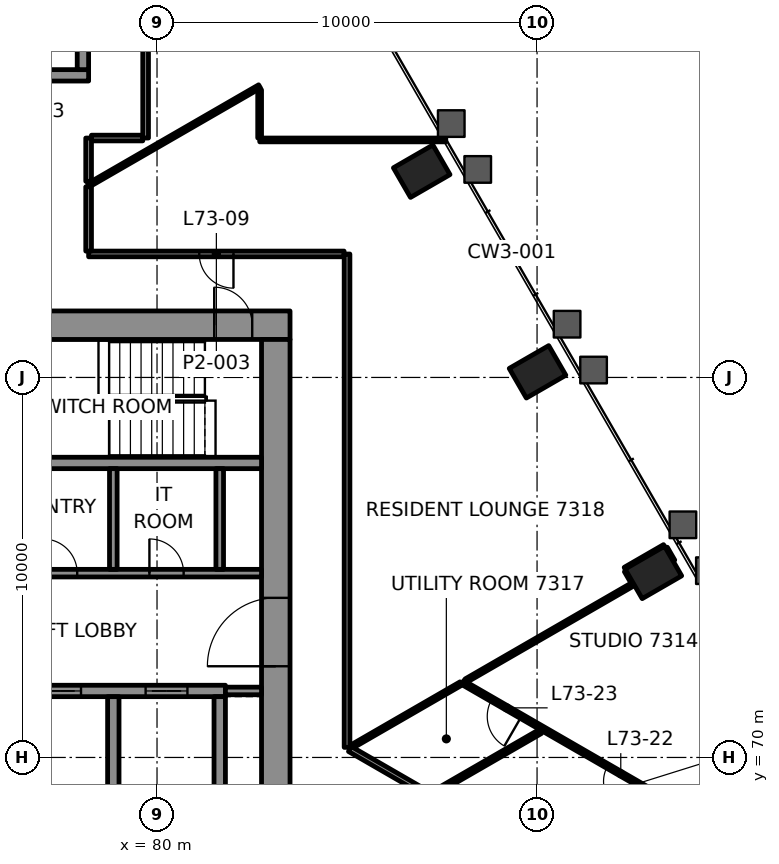
"""IFC4 building model, lengths in metres.
Left out: names, types, materials, properties, quantities, classifications, styles, units other than length and angle.
Written with IfcOpenShell. Run it as: python <this file> out.ifc"""

import sys

from ifc_helpers import new_model, si_unit, direction, frame, frame_2d, origin, origin_2d, place, context, subcontext, project, spatial, rectangle, hollow_rectangle, extrude, element, fill, save


model = new_model("IFC4")
c1 = context("Model", 3, precision=1e-05, world=origin(), true_north=direction((0.0, 1.0)))
c2 = subcontext(c1, "Body", "Model", "MODEL_VIEW")
j1 = project(units=[si_unit("LENGTHUNIT", "METRE"), si_unit("PLANEANGLEUNIT", "RADIAN")], contexts=[c1])
p1 = place(None, origin())
s1 = spatial("IfcSite", under=j1, at=p1, CompositionType="ELEMENT")
p2 = place(p1, origin())
s2 = spatial("IfcBuilding", under=s1, at=p2, CompositionType="ELEMENT")
p3 = place(p2, frame((0.0, 0.0, 302.1)))
s3 = spatial("IfcBuildingStorey", under=s2, at=p3, CompositionType="ELEMENT", Elevation=302.1)
for number, where, z_axis, x_axis in (
    (1, (93.061, 74.869, -0.0), (0.0, 0.0, 1.0), (-0.5, 0.866, 0.0)),
    (2, (90.013, 80.148, -0.0), (0.0, 0.0, 1.0), (-0.5, 0.866, 0.0)),
    (3, (86.965, 85.427, -0.0), (0.0, 0.0, 1.0), (-0.5, 0.866, 0.0)),
):
    element("IfcColumn", number, at=place(p3, frame(where, z_axis=z_axis, x_axis=x_axis)), inside=s3, PredefinedType="COLUMN", context=c2, shape_type="SweptSolid", body=[
        extrude(hollow_rectangle(XDim=0.9, YDim=1.2, WallThickness=0.06, at=origin_2d()), origin(), (0.0, 0.0, 1.0), 3.5),
    ])
p4 = place(p3, frame((66.5, 81.375, 0.0), z_axis=(0.0, 0.0, 1.0), x_axis=(1.0, 0.0, 0.0)))
e4 = element("IfcWall", 4, at=p4, inside=s3, PredefinedType="SHEAR", context=c2, shape_type="SweptSolid", body=[
    extrude(rectangle(XDim=17.0, YDim=0.75, at=frame_2d((8.5, 0.0))), origin(), (0.0, 0.0, 1.0), 3.3),
])
p5 = place(p4, frame((1.195, 0.0, 0.0)))
e5 = element("IfcOpeningElement", 5, at=p5, cuts=e4, PredefinedType="OPENING", context=c2, shape_type="SweptSolid", body=[
    extrude(rectangle(XDim=1.0, YDim=2.1, at=frame_2d((0.5, 1.05))), frame((0.0, 0.385, 0.0), z_axis=(0.0, -1.0, 0.0), x_axis=(1.0, 0.0, 0.0)), (0.0, 0.0, 1.0), 0.77),
])
p6 = place(p4, frame((15.005, 0.0, 0.0)))
e6 = element("IfcOpeningElement", 6, at=p6, cuts=e4, PredefinedType="OPENING", context=c2, shape_type="SweptSolid", body=[
    extrude(rectangle(XDim=1.0, YDim=2.1, at=frame_2d((0.5, 1.05))), frame((0.0, 0.385, 0.0), z_axis=(0.0, -1.0, 0.0), x_axis=(1.0, 0.0, 0.0)), (0.0, 0.0, 1.0), 0.77),
])
p7 = place(p4, frame((8.15, 0.0, 0.0)))
e7 = element("IfcOpeningElement", 7, at=p7, cuts=e4, PredefinedType="OPENING", context=c2, shape_type="SweptSolid", body=[
    extrude(rectangle(XDim=0.9, YDim=2.1, at=frame_2d((0.45, 1.05))), frame((0.0, 0.385, 0.0), z_axis=(0.0, -1.0, 0.0), x_axis=(1.0, 0.0, 0.0)), (0.0, 0.0, 1.0), 0.77),
])
p8 = place(p3, frame((83.125, 69.0, 0.0), z_axis=(0.0, 0.0, 1.0), x_axis=(0.0, 1.0, 0.0)))
e8 = element("IfcWall", 8, at=p8, inside=s3, PredefinedType="SHEAR", context=c2, shape_type="SweptSolid", body=[
    extrude(rectangle(XDim=12.0, YDim=0.75, at=frame_2d((6.0, 0.0))), origin(), (0.0, 0.0, 1.0), 3.3),
])
p9 = place(p8, frame((3.4, 0.0, 0.0)))
e9 = element("IfcOpeningElement", 9, at=p9, cuts=e8, PredefinedType="OPENING", context=c2, shape_type="SweptSolid", body=[
    extrude(rectangle(XDim=1.8, YDim=2.1, at=frame_2d((0.9, 1.05))), frame((0.0, 0.385, 0.0), z_axis=(0.0, -1.0, 0.0), x_axis=(1.0, 0.0, 0.0)), (0.0, 0.0, 1.0), 0.77),
])
p10 = place(p3, frame((70.3, 71.75, 0.0), z_axis=(0.0, 0.0, 1.0), x_axis=(1.0, 0.0, 0.0)))
e10 = element("IfcWall", 10, at=p10, inside=s3, PredefinedType="SHEAR", context=c2, shape_type="SweptSolid", body=[
    extrude(rectangle(XDim=11.5, YDim=0.3, at=frame_2d((5.75, 0.0))), origin(), (0.0, 0.0, 1.0), 3.3),
])
p11 = place(p10, frame((1.0, 0.0, 0.0)))
e11 = element("IfcOpeningElement", 11, at=p11, cuts=e10, PredefinedType="OPENING", context=c2, shape_type="SweptSolid", body=[
    extrude(rectangle(XDim=1.1, YDim=2.1, at=frame_2d((0.55, 1.05))), frame((0.0, 0.16, 0.0), z_axis=(0.0, -1.0, 0.0), x_axis=(1.0, 0.0, 0.0)), (0.0, 0.0, 1.0), 0.32),
])
p12 = place(p10, frame((3.8, 0.0, 0.0)))
e12 = element("IfcOpeningElement", 12, at=p12, cuts=e10, PredefinedType="OPENING", context=c2, shape_type="SweptSolid", body=[
    extrude(rectangle(XDim=1.1, YDim=2.1, at=frame_2d((0.55, 1.05))), frame((0.0, 0.16, 0.0), z_axis=(0.0, -1.0, 0.0), x_axis=(1.0, 0.0, 0.0)), (0.0, 0.0, 1.0), 0.32),
])
p13 = place(p10, frame((6.6, 0.0, 0.0)))
e13 = element("IfcOpeningElement", 13, at=p13, cuts=e10, PredefinedType="OPENING", context=c2, shape_type="SweptSolid", body=[
    extrude(rectangle(XDim=1.1, YDim=2.1, at=frame_2d((0.55, 1.05))), frame((0.0, 0.16, 0.0), z_axis=(0.0, -1.0, 0.0), x_axis=(1.0, 0.0, 0.0)), (0.0, 0.0, 1.0), 0.32),
])
p14 = place(p10, frame((9.4, 0.0, 0.0)))
e14 = element("IfcOpeningElement", 14, at=p14, cuts=e10, PredefinedType="OPENING", context=c2, shape_type="SweptSolid", body=[
    extrude(rectangle(XDim=1.1, YDim=2.1, at=frame_2d((0.55, 1.05))), frame((0.0, 0.16, 0.0), z_axis=(0.0, -1.0, 0.0), x_axis=(1.0, 0.0, 0.0)), (0.0, 0.0, 1.0), 0.32),
])
for number, where, z_axis, x_axis in (
    (15, (78.85, 69.0, 0.0), (0.0, 0.0, 1.0), (0.0, 1.0, 0.0)),
    (16, (81.65, 69.0, 0.0), (0.0, 0.0, 1.0), (0.0, 1.0, 0.0)),
):
    element("IfcWall", number, at=place(p3, frame(where, z_axis=z_axis, x_axis=x_axis)), inside=s3, PredefinedType="SHEAR", context=c2, shape_type="SweptSolid", body=[
        extrude(rectangle(XDim=2.6, YDim=0.3, at=frame_2d((1.3, 0.0))), origin(), (0.0, 0.0, 1.0), 3.3),
    ])
p15 = place(p3, frame((67.25, 77.75, 0.0), z_axis=(0.0, 0.0, 1.0), x_axis=(1.0, 0.0, 0.0)))
e17 = element("IfcWall", 17, at=p15, inside=s3, PredefinedType="SHEAR", context=c2, shape_type="SweptSolid", body=[
    extrude(rectangle(XDim=15.5, YDim=0.3, at=frame_2d((7.75, 0.0))), origin(), (0.0, 0.0, 1.0), 3.3),
])
p16 = place(p15, frame((0.445, 0.0, 0.0)))
e18 = element("IfcOpeningElement", 18, at=p16, cuts=e17, PredefinedType="OPENING", context=c2, shape_type="SweptSolid", body=[
    extrude(rectangle(XDim=1.0, YDim=2.1, at=frame_2d((0.5, 1.05))), frame((0.0, 0.16, 0.0), z_axis=(0.0, -1.0, 0.0), x_axis=(1.0, 0.0, 0.0)), (0.0, 0.0, 1.0), 0.32),
])
p17 = place(p3, frame((71.8, 87.95, 0.0), z_axis=(0.0, 0.0, 1.0), x_axis=(1.0, 0.0, 0.0)))
e19 = element("IfcWall", 19, at=p17, inside=s3, PredefinedType="SHEAR", context=c2, shape_type="SweptSolid", body=[
    extrude(rectangle(XDim=6.4, YDim=0.3, at=frame_2d((3.2, 0.0))), origin(), (0.0, 0.0, 1.0), 3.3),
])
p18 = place(p17, frame((1.325, 0.0, 0.0)))
e20 = element("IfcOpeningElement", 20, at=p18, cuts=e19, PredefinedType="OPENING", context=c2, shape_type="SweptSolid", body=[
    extrude(rectangle(XDim=1.0, YDim=2.1, at=frame_2d((0.5, 1.05))), frame((0.0, 0.16, 0.0), z_axis=(0.0, -1.0, 0.0), x_axis=(1.0, 0.0, 0.0)), (0.0, 0.0, 1.0), 0.32),
])
p19 = place(p17, frame((4.125, 0.0, 0.0)))
e21 = element("IfcOpeningElement", 21, at=p19, cuts=e19, PredefinedType="OPENING", context=c2, shape_type="SweptSolid", body=[
    extrude(rectangle(XDim=1.2, YDim=2.1, at=frame_2d((0.6, 1.05))), frame((0.0, 0.16, 0.0), z_axis=(0.0, -1.0, 0.0), x_axis=(1.0, 0.0, 0.0)), (0.0, 0.0, 1.0), 0.32),
])
p20 = place(p3, frame((78.05, 88.1, 0.0), z_axis=(0.0, 0.0, 1.0), x_axis=(0.0, 1.0, 0.0)))
e22 = element("IfcWall", 22, at=p20, inside=s3, PredefinedType="SHEAR", context=c2, shape_type="SweptSolid", body=[
    extrude(rectangle(XDim=6.2, YDim=0.3, at=frame_2d((3.1, 0.0))), origin(), (0.0, 0.0, 1.0), 3.3),
])
p21 = place(p3, frame((84.923, 83.25, 0.0), z_axis=(0.0, 0.0, 1.0), x_axis=(-1.0, 0.0, 0.0)))
e23 = element("IfcWall", 23, at=p21, inside=s3, PredefinedType="PARTITIONING", context=c2, shape_type="SweptSolid", body=[
    extrude(rectangle(XDim=6.723, YDim=0.15, at=frame_2d((3.362, 0.0))), origin(), (0.0, 0.0, 1.0), 2.7),
])
p22 = place(p21, frame((2.911, 0.0, 0.0)))
e24 = element("IfcOpeningElement", 24, at=p22, cuts=e23, PredefinedType="OPENING", context=c2, shape_type="SweptSolid", body=[
    extrude(rectangle(XDim=0.9, YDim=2.1, at=frame_2d((0.45, 1.05))), frame((0.0, 0.085, 0.0), z_axis=(0.0, -1.0, 0.0), x_axis=(1.0, 0.0, 0.0)), (0.0, 0.0, 1.0), 0.17),
])
p23 = place(p3, frame((82.702, 86.25, 0.0), z_axis=(0.0, 0.0, 1.0), x_axis=(1.0, 0.0, 0.0)))
e25 = element("IfcWall", 25, at=p23, inside=s3, PredefinedType="PARTITIONING", context=c2, shape_type="SweptSolid", body=[
    extrude(rectangle(XDim=4.896, YDim=0.1, at=frame_2d((2.448, 0.0))), origin(), (0.0, 0.0, 1.0), 2.688),
])
p24 = place(p3, frame((78.275, 86.3, 0.0), z_axis=(0.0, 0.0, 1.0), x_axis=(1.0, 0.0, 0.0)))
e26 = element("IfcWall", 26, at=p24, inside=s3, PredefinedType="PARTITIONING", context=c2, shape_type="SweptSolid", body=[
    extrude(rectangle(XDim=1.35, YDim=0.15, at=frame_2d((0.675, 0.0))), origin(), (0.0, 0.0, 1.0), 2.7),
])
p25 = place(p3, frame((87.292, 69.069, 0.0), z_axis=(0.0, 0.0, 1.0), x_axis=(0.86605210011, 0.499953757757, 0.0)))
e27 = element("IfcWall", 27, at=p25, inside=s3, PredefinedType="PARTITIONING", context=c2, shape_type="SweptSolid", body=[
    extrude(rectangle(XDim=3.228, YDim=0.12, at=frame_2d((1.614, 0.0))), origin(), (0.0, 0.0, 1.0), 2.7),
])
p26 = place(p3, frame((85.145, 70.299, 0.0), z_axis=(0.0, 0.0, 1.0), x_axis=(0.866032610133, 0.499987518031, 0.0)))
e28 = element("IfcWall", 28, at=p26, inside=s3, PredefinedType="PARTITIONING", context=c2, shape_type="SweptSolid", body=[
    extrude(rectangle(XDim=3.295, YDim=0.1, at=frame_2d((1.648, 0.0))), origin(), (0.0, 0.0, 1.0), 2.7),
])
p27 = place(p3, frame((92.318, 74.959, 0.0), z_axis=(0.0, 0.0, 1.0), x_axis=(0.866087020037, 0.499893262331, 0.0)))
e29 = element("IfcWall", 29, at=p27, inside=s3, PredefinedType="PARTITIONING", context=c2, shape_type="SweptSolid", body=[
    extrude(rectangle(XDim=1.196, YDim=0.1, at=frame_2d((0.598, 0.0))), origin(), (0.0, 0.0, 1.0), 2.688),
])
p28 = place(p3, frame((78.2, 85.06, 0.0), z_axis=(0.0, 0.0, 1.0), x_axis=(0.866025161861, 0.500000419024, 0.0)))
e30 = element("IfcWall", 30, at=p28, inside=s3, PredefinedType="PARTITIONING", context=c2, shape_type="SweptSolid", body=[
    extrude(rectangle(XDim=5.195, YDim=0.1, at=frame_2d((2.598, 0.0))), origin(), (0.0, 0.0, 1.0), 2.7),
])
p29 = place(p3, frame((85.0, 70.266, 0.0), z_axis=(0.0, 0.0, 1.0), x_axis=(0.0, 1.0, 0.0)))
e31 = element("IfcWall", 31, at=p29, inside=s3, PredefinedType="PARTITIONING", context=c2, shape_type="SweptSolid", body=[
    extrude(rectangle(XDim=12.982, YDim=0.15, at=frame_2d((6.491, 0.0))), origin(), (0.0, 0.0, 1.0), 2.7),
])
p30 = place(p3, frame((82.7, 86.302, 0.0), z_axis=(0.0, 0.0, 1.0), x_axis=(0.0, 1.0, 0.0)))
e32 = element("IfcWall", 32, at=p30, inside=s3, PredefinedType="PARTITIONING", context=c2, shape_type="SweptSolid", body=[
    extrude(rectangle(XDim=1.267, YDim=0.1, at=frame_2d((0.634, 0.0))), origin(), (0.0, 0.0, 1.0), 2.7),
])
p31 = place(p3, frame((79.7, 86.301, 0.0), z_axis=(0.0, 0.0, 1.0), x_axis=(0.0, 1.0, 0.0)))
e33 = element("IfcWall", 33, at=p31, inside=s3, PredefinedType="PARTITIONING", context=c2, shape_type="SweptSolid", body=[
    extrude(rectangle(XDim=9.799, YDim=0.15, at=frame_2d((4.899, 0.0))), origin(), (0.0, 0.0, 1.0), 2.7),
])
p32 = place(p3, frame((78.2, 83.325, 0.0), z_axis=(0.0, 0.0, 1.0), x_axis=(0.0, 1.0, 0.0)))
e34 = element("IfcWall", 34, at=p32, inside=s3, PredefinedType="PARTITIONING", context=c2, shape_type="SweptSolid", body=[
    extrude(rectangle(XDim=1.692, YDim=0.15, at=frame_2d((0.846, 0.0))), origin(), (0.0, 0.0, 1.0), 2.7),
])
p33 = place(p3, frame((93.58, 75.169, 0.0), z_axis=(0.0, 0.0, 1.0), x_axis=(-0.500153222552, 0.865936922628, 0.0)))
e35 = element("IfcWall", 35, at=p33, inside=s3, PredefinedType="PARTITIONING", context=c2, shape_type="SweptSolid", body=[
    extrude(rectangle(XDim=0.393, YDim=0.1, at=frame_2d((0.196, 0.0))), origin(), (0.0, 0.0, 1.0), 2.7),
])
p34 = place(p3, frame((92.511, 74.621, 0.0), z_axis=(0.0, 0.0, 1.0), x_axis=(-0.499868360126, 0.866101392762, 0.0)))
e36 = element("IfcWall", 36, at=p34, inside=s3, PredefinedType="PARTITIONING", context=c2, shape_type="SweptSolid", body=[
    extrude(rectangle(XDim=0.338, YDim=0.1, at=frame_2d((0.169, 0.0))), origin(), (0.0, 0.0, 1.0), 2.7),
])
p35 = place(p3, frame((99.74, 65.22, 0.0), z_axis=(0.0, 0.0, 1.0), x_axis=(-0.866029646425, 0.499992651459, 0.0)))
e37 = element("IfcWall", 37, at=p35, inside=s3, PredefinedType="PARTITIONING", context=c2, shape_type="SweptSolid", body=[
    extrude(rectangle(XDim=13.505, YDim=0.12, at=frame_2d((6.752, 0.0))), origin(), (0.0, 0.0, 1.0), 2.7),
])
p36 = place(p35, frame((3.197, 0.0, 0.0)))
e38 = element("IfcOpeningElement", 38, at=p36, cuts=e37, PredefinedType="OPENING", context=c2, shape_type="SweptSolid", body=[
    extrude(rectangle(XDim=0.9, YDim=2.1, at=frame_2d((0.45, 1.05))), frame((0.0, 0.07, 0.0), z_axis=(0.0, -1.0, 0.0), x_axis=(1.0, 0.0, 0.0)), (0.0, 0.0, 1.0), 0.14),
])
p37 = place(p35, frame((8.303, 0.0, 0.0)))
e39 = element("IfcOpeningElement", 39, at=p37, cuts=e37, PredefinedType="OPENING", context=c2, shape_type="SweptSolid", body=[
    extrude(rectangle(XDim=0.8, YDim=2.1, at=frame_2d((0.4, 1.05))), frame((0.0, 0.07, 0.0), z_axis=(0.0, -1.0, 0.0), x_axis=(1.0, 0.0, 0.0)), (0.0, 0.0, 1.0), 0.14),
])
p38 = place(p35, frame((11.721, 0.0, 0.0)))
e40 = element("IfcOpeningElement", 40, at=p38, cuts=e37, PredefinedType="OPENING", context=c2, shape_type="SweptSolid", body=[
    extrude(rectangle(XDim=0.9, YDim=2.1, at=frame_2d((0.45, 1.05))), frame((0.0, 0.07, 0.0), z_axis=(0.0, -1.0, 0.0), x_axis=(1.0, 0.0, 0.0)), (0.0, 0.0, 1.0), 0.14),
])
p39 = place(p3, frame((85.075, 70.222, 0.0), z_axis=(0.0, 0.0, 1.0), x_axis=(0.866023935413, -0.500002543286, 0.0)))
e41 = element("IfcWall", 41, at=p39, inside=s3, PredefinedType="PARTITIONING", context=c2, shape_type="SweptSolid", body=[
    extrude(rectangle(XDim=12.601, YDim=0.15, at=frame_2d((6.3, 0.0))), origin(), (0.0, 0.0, 1.0), 2.7),
])
p40 = place(p39, frame((9.249, 0.0, 0.0)))
e42 = element("IfcOpeningElement", 42, at=p40, cuts=e41, PredefinedType="OPENING", context=c2, shape_type="SweptSolid", body=[
    extrude(rectangle(XDim=1.0, YDim=2.1, at=frame_2d((0.5, 1.05))), frame((0.0, 0.085, 0.0), z_axis=(0.0, -1.0, 0.0), x_axis=(1.0, 0.0, 0.0)), (0.0, 0.0, 1.0), 0.17),
])
p41 = place(p3, frame((88.129, 72.021, 0.0), z_axis=(0.0, 0.0, 1.0), x_axis=(0.866010809447, 0.500025277282, 0.0)))
e43 = element("IfcWall", 43, at=p41, inside=s3, PredefinedType="PARTITIONING", context=c2, shape_type="SweptSolid", body=[
    extrude(rectangle(XDim=5.094, YDim=0.1, at=frame_2d((2.547, 0.0))), origin(), (0.0, 0.0, 1.0), 2.7),
])
p42 = place(p3, frame((78.2, 85.161, 0.0), z_axis=(0.0, 0.0, 1.0), x_axis=(0.0, 1.0, 0.0)))
e44 = element("IfcWall", 44, at=p42, inside=s3, PredefinedType="PARTITIONING", context=c2, shape_type="SweptSolid", body=[
    extrude(rectangle(XDim=1.139, YDim=0.15, at=frame_2d((0.57, 0.0))), origin(), (0.0, 0.0, 1.0), 2.7),
])
p43 = place(p3, frame((81.8, 71.75, 0.0), z_axis=(0.0, 0.0, 1.0), x_axis=(1.0, 0.0, 0.0)))
e45 = element("IfcWall", 45, at=p43, inside=s3, PredefinedType="PARTITIONING", context=c2, shape_type="SweptSolid", body=[
    extrude(rectangle(XDim=0.95, YDim=0.2, at=frame_2d((0.475, 0.0))), origin(), (0.0, 0.0, 1.0), 3.3),
])
p44 = place(p3, frame((76.2, 74.85, 0.0), z_axis=(0.0, 0.0, 1.0), x_axis=(1.0, 0.0, 0.0)))
e46 = element("IfcWall", 46, at=p44, inside=s3, PredefinedType="PARTITIONING", context=c2, shape_type="SweptSolid", body=[
    extrude(rectangle(XDim=6.55, YDim=0.2, at=frame_2d((3.275, 0.0))), origin(), (0.0, 0.0, 1.0), 3.3),
])
p45 = place(p44, frame((0.8, 0.0, 0.0)))
e47 = element("IfcOpeningElement", 47, at=p45, cuts=e46, PredefinedType="OPENING", context=c2, shape_type="SweptSolid", body=[
    extrude(rectangle(XDim=0.9, YDim=2.1, at=frame_2d((0.45, 1.05))), frame((0.0, 0.11, 0.0), z_axis=(0.0, -1.0, 0.0), x_axis=(1.0, 0.0, 0.0)), (0.0, 0.0, 1.0), 0.22),
])
p46 = place(p44, frame((3.6, 0.0, 0.0)))
e48 = element("IfcOpeningElement", 48, at=p46, cuts=e46, PredefinedType="OPENING", context=c2, shape_type="SweptSolid", body=[
    extrude(rectangle(XDim=0.9, YDim=2.1, at=frame_2d((0.45, 1.05))), frame((0.0, 0.11, 0.0), z_axis=(0.0, -1.0, 0.0), x_axis=(1.0, 0.0, 0.0)), (0.0, 0.0, 1.0), 0.22),
])
for number, where, z_axis, x_axis in (
    (49, (78.85, 74.95, 0.0), (0.0, 0.0, 1.0), (0.0, 1.0, 0.0)),
    (50, (81.65, 74.95, 0.0), (0.0, 0.0, 1.0), (0.0, 1.0, 0.0)),
):
    element("IfcWall", number, at=place(p3, frame(where, z_axis=z_axis, x_axis=x_axis)), inside=s3, PredefinedType="PARTITIONING", context=c2, shape_type="SweptSolid", body=[
        extrude(rectangle(XDim=2.65, YDim=0.2, at=frame_2d((1.325, 0.0))), origin(), (0.0, 0.0, 1.0), 3.3),
    ])
p47 = place(p22, origin())
e51 = element("IfcDoor", 51, at=p47, inside=s3, OperationType="SINGLE_SWING_RIGHT", PredefinedType="DOOR", context=c2, shape_type="SweptSolid", body=[
    extrude(rectangle(XDim=0.9, YDim=2.1, at=frame_2d((0.45, 1.05))), frame((0.0, 0.025, 0.0), z_axis=(0.0, -1.0, 0.0), x_axis=(1.0, 0.0, 0.0)), (0.0, 0.0, 1.0), 0.05),
])
fill(e24, e51)
p48 = place(p37, origin())
e52 = element("IfcDoor", 52, at=p48, inside=s3, OperationType="SINGLE_SWING_RIGHT", PredefinedType="DOOR", context=c2, shape_type="SweptSolid", body=[
    extrude(rectangle(XDim=0.8, YDim=2.1, at=frame_2d((0.4, 1.05))), frame((0.0, 0.025, 0.0), z_axis=(0.0, -1.0, 0.0), x_axis=(1.0, 0.0, 0.0)), (0.0, 0.0, 1.0), 0.05),
])
fill(e39, e52)
p49 = place(p38, origin())
e53 = element("IfcDoor", 53, at=p49, inside=s3, OperationType="SINGLE_SWING_LEFT", PredefinedType="DOOR", context=c2, shape_type="SweptSolid", body=[
    extrude(rectangle(XDim=0.9, YDim=2.1, at=frame_2d((0.45, 1.05))), frame((0.0, 0.025, 0.0), z_axis=(0.0, -1.0, 0.0), x_axis=(1.0, 0.0, 0.0)), (0.0, 0.0, 1.0), 0.05),
])
fill(e40, e53)
p50 = place(p13, origin())
e54 = element("IfcDoor", 54, at=p50, inside=s3, OperationType="DOUBLE_DOOR_SLIDING", PredefinedType="DOOR", context=c2, shape_type="SweptSolid", body=[
    extrude(rectangle(XDim=1.1, YDim=2.1, at=frame_2d((0.55, 1.05))), frame((0.0, 0.025, 0.0), z_axis=(0.0, -1.0, 0.0), x_axis=(1.0, 0.0, 0.0)), (0.0, 0.0, 1.0), 0.05),
])
fill(e13, e54)
p51 = place(p14, origin())
e55 = element("IfcDoor", 55, at=p51, inside=s3, OperationType="DOUBLE_DOOR_SLIDING", PredefinedType="DOOR", context=c2, shape_type="SweptSolid", body=[
    extrude(rectangle(XDim=1.1, YDim=2.1, at=frame_2d((0.55, 1.05))), frame((0.0, 0.025, 0.0), z_axis=(0.0, -1.0, 0.0), x_axis=(1.0, 0.0, 0.0)), (0.0, 0.0, 1.0), 0.05),
])
fill(e14, e55)
p52 = place(p6, origin())
e56 = element("IfcDoor", 56, at=p52, inside=s3, OperationType="SINGLE_SWING_LEFT", PredefinedType="DOOR", context=c2, shape_type="SweptSolid", body=[
    extrude(rectangle(XDim=1.0, YDim=2.1, at=frame_2d((0.5, 1.05))), frame((0.0, 0.095, 0.0), z_axis=(0.0, -1.0, 0.0), x_axis=(1.0, 0.0, 0.0)), (0.0, 0.0, 1.0), 0.19),
])
fill(e6, e56)
p53 = place(p9, origin())
e57 = element("IfcDoor", 57, at=p53, inside=s3, OperationType="SINGLE_SWING_LEFT", PredefinedType="DOOR", context=c2, shape_type="SweptSolid", body=[
    extrude(rectangle(XDim=1.8, YDim=2.1, at=frame_2d((0.9, 1.05))), frame((0.0, 0.095, 0.0), z_axis=(0.0, -1.0, 0.0), x_axis=(1.0, 0.0, 0.0)), (0.0, 0.0, 1.0), 0.19),
])
fill(e9, e57)
p54 = place(p45, origin())
e58 = element("IfcDoor", 58, at=p54, inside=s3, OperationType="SINGLE_SWING_RIGHT", PredefinedType="DOOR", context=c2, shape_type="SweptSolid", body=[
    extrude(rectangle(XDim=0.9, YDim=2.1, at=frame_2d((0.45, 1.05))), frame((0.0, 0.025, 0.0), z_axis=(0.0, -1.0, 0.0), x_axis=(1.0, 0.0, 0.0)), (0.0, 0.0, 1.0), 0.05),
])
fill(e47, e58)
p55 = place(p46, origin())
e59 = element("IfcDoor", 59, at=p55, inside=s3, OperationType="SINGLE_SWING_LEFT", PredefinedType="DOOR", context=c2, shape_type="SweptSolid", body=[
    extrude(rectangle(XDim=0.9, YDim=2.1, at=frame_2d((0.45, 1.05))), frame((0.0, 0.025, 0.0), z_axis=(0.0, -1.0, 0.0), x_axis=(1.0, 0.0, 0.0)), (0.0, 0.0, 1.0), 0.05),
])
fill(e48, e59)
save(model, sys.argv[1])
